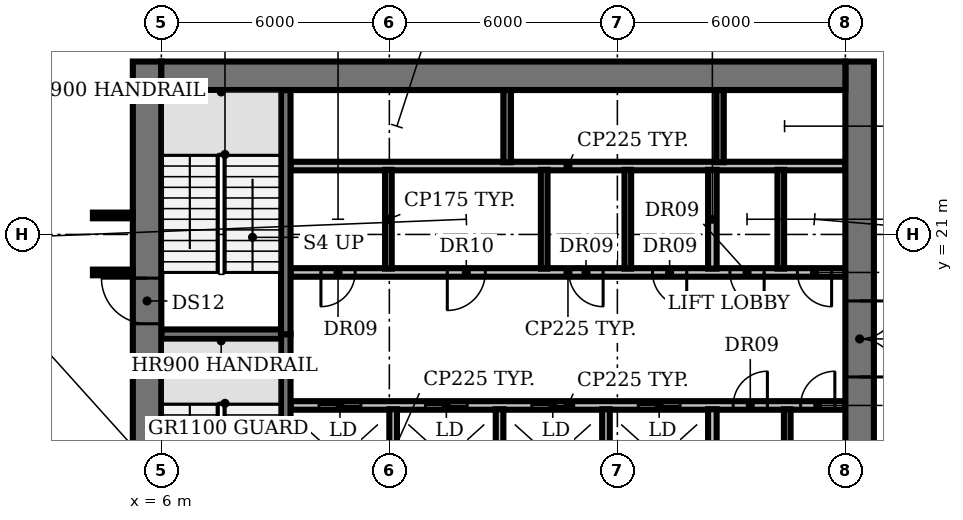
"""IFC4 building model, lengths in metres.
Left out: names, types, materials, properties, quantities, classifications, styles, units other than length and angle.
Written with IfcOpenShell. Run it as: python <this file> out.ifc"""

import sys

from ifc_helpers import new_model, si_unit, direction, frame, frame_2d, origin, place, context, subcontext, project, spatial, rectangle, extrude, element, fill, save


model = new_model("IFC4")
c1 = context("Model", 3, precision=1e-05, world=origin(), true_north=direction((0.0, 1.0)))
c2 = subcontext(c1, "Body", "Model", "MODEL_VIEW")
j1 = project(units=[si_unit("LENGTHUNIT", "METRE"), si_unit("PLANEANGLEUNIT", "RADIAN")], contexts=[c1])
p1 = place(None, origin())
s1 = spatial("IfcSite", under=j1, at=p1, CompositionType="ELEMENT")
p2 = place(p1, origin())
s2 = spatial("IfcBuilding", under=s1, at=p2, CompositionType="ELEMENT")
p3 = place(p2, frame((0.0, 0.0, 104.6)))
s3 = spatial("IfcBuildingStorey", under=s2, at=p3, CompositionType="ELEMENT", Elevation=104.6)
p4 = place(p3, frame((9.4, 16.5, 0.0), z_axis=(0.0, 0.0, 1.0), x_axis=(1.0, 0.0, 0.0)))
e1 = element("IfcWall", 1, at=p4, inside=s3, PredefinedType="PARTITIONING", context=c2, shape_type="SweptSolid", body=[
    extrude(rectangle(XDim=14.6, YDim=0.225, at=frame_2d((7.3, 0.0))), origin(), (0.0, 0.0, 1.0), 3.85),
])
p5 = place(p4, frame((0.75, 0.0, 0.0)))
e2 = element("IfcOpeningElement", 2, at=p5, cuts=e1, PredefinedType="OPENING", context=c2, shape_type="SweptSolid", body=[
    extrude(rectangle(XDim=1.1, YDim=2.1, at=frame_2d((0.55, 1.05))), frame((0.0, 0.123, 0.0), z_axis=(0.0, -1.0, 0.0), x_axis=(1.0, 0.0, 0.0)), (0.0, 0.0, 1.0), 0.245),
])
p6 = place(p4, frame((3.55, 0.0, 0.0)))
e3 = element("IfcOpeningElement", 3, at=p6, cuts=e1, PredefinedType="OPENING", context=c2, shape_type="SweptSolid", body=[
    extrude(rectangle(XDim=1.1, YDim=2.1, at=frame_2d((0.55, 1.05))), frame((0.0, 0.123, 0.0), z_axis=(0.0, -1.0, 0.0), x_axis=(1.0, 0.0, 0.0)), (0.0, 0.0, 1.0), 0.245),
])
p7 = place(p4, frame((6.35, 0.0, 0.0)))
e4 = element("IfcOpeningElement", 4, at=p7, cuts=e1, PredefinedType="OPENING", context=c2, shape_type="SweptSolid", body=[
    extrude(rectangle(XDim=1.1, YDim=2.1, at=frame_2d((0.55, 1.05))), frame((0.0, 0.123, 0.0), z_axis=(0.0, -1.0, 0.0), x_axis=(1.0, 0.0, 0.0)), (0.0, 0.0, 1.0), 0.245),
])
p8 = place(p4, frame((9.15, 0.0, 0.0)))
e5 = element("IfcOpeningElement", 5, at=p8, cuts=e1, PredefinedType="OPENING", context=c2, shape_type="SweptSolid", body=[
    extrude(rectangle(XDim=1.1, YDim=2.1, at=frame_2d((0.55, 1.05))), frame((0.0, 0.123, 0.0), z_axis=(0.0, -1.0, 0.0), x_axis=(1.0, 0.0, 0.0)), (0.0, 0.0, 1.0), 0.245),
])
p9 = place(p4, frame((11.647, 0.0, 0.0)))
e6 = element("IfcOpeningElement", 6, at=p9, cuts=e1, PredefinedType="OPENING", context=c2, shape_type="SweptSolid", body=[
    extrude(rectangle(XDim=0.9, YDim=2.1, at=frame_2d((0.45, 1.05))), frame((0.0, 0.123, 0.0), z_axis=(0.0, -1.0, 0.0), x_axis=(1.0, 0.0, 0.0)), (0.0, 0.0, 1.0), 0.245),
])
p10 = place(p4, frame((13.423, 0.0, 0.0)))
e7 = element("IfcOpeningElement", 7, at=p10, cuts=e1, PredefinedType="OPENING", context=c2, shape_type="SweptSolid", body=[
    extrude(rectangle(XDim=0.9, YDim=2.1, at=frame_2d((0.45, 1.05))), frame((0.0, 0.123, 0.0), z_axis=(0.0, -1.0, 0.0), x_axis=(1.0, 0.0, 0.0)), (0.0, 0.0, 1.0), 0.245),
])
p11 = place(p3, frame((6.0, 18.375, 0.0), z_axis=(0.0, 0.0, 1.0), x_axis=(1.0, 0.0, 0.0)))
e8 = element("IfcWall", 8, at=p11, inside=s3, PredefinedType="SHEAR", context=c2, shape_type="SweptSolid", body=[
    extrude(rectangle(XDim=3.15, YDim=0.25, at=frame_2d((1.575, 0.0))), origin(), (0.0, 0.0, 1.0), 3.85),
])
p12 = place(p3, frame((24.0, 20.0, 0.0), z_axis=(0.0, 0.0, 1.0), x_axis=(-1.0, 0.0, 0.0)))
e9 = element("IfcWall", 9, at=p12, inside=s3, PredefinedType="PARTITIONING", context=c2, shape_type="SweptSolid", body=[
    extrude(rectangle(XDim=14.6, YDim=0.225, at=frame_2d((7.3, 0.0))), origin(), (0.0, 0.0, 1.0), 3.85),
])
p13 = place(p12, frame((12.9, 0.0, 0.0)))
e10 = element("IfcOpeningElement", 10, at=p13, cuts=e9, PredefinedType="OPENING", context=c2, shape_type="SweptSolid", body=[
    extrude(rectangle(XDim=0.9, YDim=2.1, at=frame_2d((0.45, 1.05))), frame((0.0, 0.123, 0.0), z_axis=(0.0, -1.0, 0.0), x_axis=(1.0, 0.0, 0.0)), (0.0, 0.0, 1.0), 0.245),
])
p14 = place(p12, frame((9.475, 0.0, 0.0)))
e11 = element("IfcOpeningElement", 11, at=p14, cuts=e9, PredefinedType="OPENING", context=c2, shape_type="SweptSolid", body=[
    extrude(rectangle(XDim=1.0, YDim=2.1, at=frame_2d((0.5, 1.05))), frame((0.0, 0.123, 0.0), z_axis=(0.0, -1.0, 0.0), x_axis=(1.0, 0.0, 0.0)), (0.0, 0.0, 1.0), 0.245),
])
p15 = place(p12, frame((6.375, 0.0, 0.0)))
e12 = element("IfcOpeningElement", 12, at=p15, cuts=e9, PredefinedType="OPENING", context=c2, shape_type="SweptSolid", body=[
    extrude(rectangle(XDim=0.9, YDim=2.1, at=frame_2d((0.45, 1.05))), frame((0.0, 0.123, 0.0), z_axis=(0.0, -1.0, 0.0), x_axis=(1.0, 0.0, 0.0)), (0.0, 0.0, 1.0), 0.245),
])
p16 = place(p12, frame((4.175, 0.0, 0.0)))
e13 = element("IfcOpeningElement", 13, at=p16, cuts=e9, PredefinedType="OPENING", context=c2, shape_type="SweptSolid", body=[
    extrude(rectangle(XDim=0.9, YDim=2.1, at=frame_2d((0.45, 1.05))), frame((0.0, 0.123, 0.0), z_axis=(0.0, -1.0, 0.0), x_axis=(1.0, 0.0, 0.0)), (0.0, 0.0, 1.0), 0.245),
])
p17 = place(p12, frame((2.137, 0.0, 0.0)))
e14 = element("IfcOpeningElement", 14, at=p17, cuts=e9, PredefinedType="OPENING", context=c2, shape_type="SweptSolid", body=[
    extrude(rectangle(XDim=0.9, YDim=2.1, at=frame_2d((0.45, 1.05))), frame((0.0, 0.123, 0.0), z_axis=(0.0, -1.0, 0.0), x_axis=(1.0, 0.0, 0.0)), (0.0, 0.0, 1.0), 0.245),
])
p18 = place(p12, frame((0.363, 0.0, 0.0)))
e15 = element("IfcOpeningElement", 15, at=p18, cuts=e9, PredefinedType="OPENING", context=c2, shape_type="SweptSolid", body=[
    extrude(rectangle(XDim=0.9, YDim=2.1, at=frame_2d((0.45, 1.05))), frame((0.0, 0.123, 0.0), z_axis=(0.0, -1.0, 0.0), x_axis=(1.0, 0.0, 0.0)), (0.0, 0.0, 1.0), 0.245),
])
p19 = place(p3, frame((9.4, 22.8, 0.0), z_axis=(0.0, 0.0, 1.0), x_axis=(1.0, 0.0, 0.0)))
e16 = element("IfcWall", 16, at=p19, inside=s3, PredefinedType="PARTITIONING", context=c2, shape_type="SweptSolid", body=[
    extrude(rectangle(XDim=14.6, YDim=0.225, at=frame_2d((7.3, 0.0))), origin(), (0.0, 0.0, 1.0), 3.85),
])
p20 = place(p3, frame((9.275, 18.375, 0.0), z_axis=(0.0, 0.0, 1.0), x_axis=(0.0, -1.0, 0.0)))
e17 = element("IfcWall", 17, at=p20, inside=s3, PredefinedType="SHEAR", context=c2, shape_type="SweptSolid", body=[
    extrude(rectangle(XDim=6.55, YDim=0.25, at=frame_2d((3.275, 0.0))), origin(), (0.0, 0.0, 1.0), 3.85),
])
p21 = place(p20, frame((5.075, 0.0, 0.0)))
e18 = element("IfcOpeningElement", 18, at=p21, cuts=e17, PredefinedType="OPENING", context=c2, shape_type="SweptSolid", body=[
    extrude(rectangle(XDim=1.0, YDim=2.1, at=frame_2d((0.5, 1.05))), frame((0.0, 0.135, 0.0), z_axis=(0.0, -1.0, 0.0), x_axis=(1.0, 0.0, 0.0)), (0.0, 0.0, 1.0), 0.27),
])
p22 = place(p3, frame((9.275, 18.375, 0.0), z_axis=(0.0, 0.0, 1.0), x_axis=(0.0, 1.0, 0.0)))
e19 = element("IfcWall", 19, at=p22, inside=s3, PredefinedType="SHEAR", context=c2, shape_type="SweptSolid", body=[
    extrude(rectangle(XDim=6.425, YDim=0.25, at=frame_2d((3.212, 0.0))), origin(), (0.0, 0.0, 1.0), 3.85),
])
p23 = place(p3, frame((11.975, 20.1, 0.0), z_axis=(0.0, 0.0, 1.0), x_axis=(0.0, 1.0, 0.0)))
e20 = element("IfcWall", 20, at=p23, inside=s3, PredefinedType="PARTITIONING", context=c2, shape_type="SweptSolid", body=[
    extrude(rectangle(XDim=2.6, YDim=0.175, at=frame_2d((1.3, 0.0))), origin(), (0.0, 0.0, 1.0), 3.85),
])
for number, where, z_axis, x_axis in (
    (21, (12.1, 13.8, 0.0), (0.0, 0.0, 1.0), (0.0, 1.0, 0.0)),
    (22, (14.9, 13.8, 0.0), (0.0, 0.0, 1.0), (0.0, 1.0, 0.0)),
):
    element("IfcWall", number, at=place(p3, frame(where, z_axis=z_axis, x_axis=x_axis)), inside=s3, PredefinedType="SOLIDWALL", context=c2, shape_type="SweptSolid", body=[
        extrude(rectangle(XDim=2.6, YDim=0.2, at=frame_2d((1.3, 0.0))), origin(), (0.0, 0.0, 1.0), 3.85),
    ])
p24 = place(p3, frame((15.1, 22.9, 0.0), z_axis=(0.0, 0.0, 1.0), x_axis=(0.0, 1.0, 0.0)))
e23 = element("IfcWall", 23, at=p24, inside=s3, PredefinedType="SHEAR", context=c2, shape_type="SweptSolid", body=[
    extrude(rectangle(XDim=1.9, YDim=0.2, at=frame_2d((0.95, 0.0))), origin(), (0.0, 0.0, 1.0), 3.85),
])
p25 = place(p3, frame((16.075, 20.1, 0.0), z_axis=(0.0, 0.0, 1.0), x_axis=(0.0, 1.0, 0.0)))
e24 = element("IfcWall", 24, at=p25, inside=s3, PredefinedType="PARTITIONING", context=c2, shape_type="SweptSolid", body=[
    extrude(rectangle(XDim=2.6, YDim=0.175, at=frame_2d((1.3, 0.0))), origin(), (0.0, 0.0, 1.0), 3.85),
])
p26 = place(p3, frame((17.7, 13.8, 0.0), z_axis=(0.0, 0.0, 1.0), x_axis=(0.0, 1.0, 0.0)))
e25 = element("IfcWall", 25, at=p26, inside=s3, PredefinedType="SOLIDWALL", context=c2, shape_type="SweptSolid", body=[
    extrude(rectangle(XDim=2.6, YDim=0.2, at=frame_2d((1.3, 0.0))), origin(), (0.0, 0.0, 1.0), 3.85),
])
p27 = place(p3, frame((18.275, 20.1, 0.0), z_axis=(0.0, 0.0, 1.0), x_axis=(0.0, 1.0, 0.0)))
e26 = element("IfcWall", 26, at=p27, inside=s3, PredefinedType="PARTITIONING", context=c2, shape_type="SweptSolid", body=[
    extrude(rectangle(XDim=2.6, YDim=0.175, at=frame_2d((1.3, 0.0))), origin(), (0.0, 0.0, 1.0), 3.85),
])
for number, where, z_axis, x_axis in (
    (27, (20.5, 13.8, 0.0), (0.0, 0.0, 1.0), (0.0, 1.0, 0.0)),
    (28, (20.5, 20.1, 0.0), (0.0, 0.0, 1.0), (0.0, 1.0, 0.0)),
):
    element("IfcWall", number, at=place(p3, frame(where, z_axis=z_axis, x_axis=x_axis)), inside=s3, PredefinedType="PARTITIONING", context=c2, shape_type="SweptSolid", body=[
        extrude(rectangle(XDim=2.6, YDim=0.225, at=frame_2d((1.3, 0.0))), origin(), (0.0, 0.0, 1.0), 3.85),
    ])
p28 = place(p3, frame((20.7, 22.9, 0.0), z_axis=(0.0, 0.0, 1.0), x_axis=(0.0, 1.0, 0.0)))
e29 = element("IfcWall", 29, at=p28, inside=s3, PredefinedType="SHEAR", context=c2, shape_type="SweptSolid", body=[
    extrude(rectangle(XDim=1.9, YDim=0.2, at=frame_2d((0.95, 0.0))), origin(), (0.0, 0.0, 1.0), 3.85),
])
for number, where, z_axis, x_axis in (
    (30, (22.3, 20.1, 0.0), (0.0, 0.0, 1.0), (0.0, 1.0, 0.0)),
    (31, (22.47, 13.8, 0.0), (0.0, 0.0, 1.0), (0.0, 1.0, 0.0)),
):
    element("IfcWall", number, at=place(p3, frame(where, z_axis=z_axis, x_axis=x_axis)), inside=s3, PredefinedType="PARTITIONING", context=c2, shape_type="SweptSolid", body=[
        extrude(rectangle(XDim=2.6, YDim=0.175, at=frame_2d((1.3, 0.0))), origin(), (0.0, 0.0, 1.0), 3.85),
    ])
p29 = place(p3, frame((5.625, 4.47, 0.0), z_axis=(0.0, 0.0, 1.0), x_axis=(0.0, 1.0, 0.0)))
e32 = element("IfcWall", 32, at=p29, inside=s3, PredefinedType="SHEAR", context=c2, shape_type="SweptSolid", body=[
    extrude(rectangle(XDim=21.08, YDim=0.75, at=frame_2d((10.54, 0.0))), origin(), (0.0, 0.0, 1.0), 3.85),
])
p30 = place(p29, frame((1.18, 0.0, 0.0)))
e33 = element("IfcOpeningElement", 33, at=p30, cuts=e32, PredefinedType="OPENING", context=c2, shape_type="SweptSolid", body=[
    extrude(rectangle(XDim=1.5, YDim=2.1, at=frame_2d((0.75, 1.05))), frame((0.0, 0.385, 0.0), z_axis=(0.0, -1.0, 0.0), x_axis=(1.0, 0.0, 0.0)), (0.0, 0.0, 1.0), 0.77),
])
p31 = place(p29, frame((7.63, 0.0, 0.0)))
e34 = element("IfcOpeningElement", 34, at=p31, cuts=e32, PredefinedType="OPENING", context=c2, shape_type="SweptSolid", body=[
    extrude(rectangle(XDim=1.2, YDim=2.1, at=frame_2d((0.6, 1.05))), frame((0.0, 0.385, 0.0), z_axis=(0.0, -1.0, 0.0), x_axis=(1.0, 0.0, 0.0)), (0.0, 0.0, 1.0), 0.77),
])
p32 = place(p29, frame((14.18, 0.0, 0.0)))
e35 = element("IfcOpeningElement", 35, at=p32, cuts=e32, PredefinedType="OPENING", context=c2, shape_type="SweptSolid", body=[
    extrude(rectangle(XDim=1.2, YDim=2.1, at=frame_2d((0.6, 1.05))), frame((0.0, 0.385, 0.0), z_axis=(0.0, -1.0, 0.0), x_axis=(1.0, 0.0, 0.0)), (0.0, 0.0, 1.0), 0.77),
])
p33 = place(p3, frame((24.375, 25.55, 0.0), z_axis=(0.0, 0.0, 1.0), x_axis=(0.0, -1.0, 0.0)))
e36 = element("IfcWall", 36, at=p33, inside=s3, PredefinedType="SHEAR", context=c2, shape_type="SweptSolid", body=[
    extrude(rectangle(XDim=21.13, YDim=0.75, at=frame_2d((10.565, 0.0))), origin(), (0.0, 0.0, 1.0), 3.85),
])
p34 = place(p33, frame((18.4, 0.0, 0.0)))
e37 = element("IfcOpeningElement", 37, at=p34, cuts=e36, PredefinedType="OPENING", context=c2, shape_type="SweptSolid", body=[
    extrude(rectangle(XDim=1.5, YDim=2.1, at=frame_2d((0.75, 1.05))), frame((0.0, 0.385, 0.0), z_axis=(0.0, -1.0, 0.0), x_axis=(1.0, 0.0, 0.0)), (0.0, 0.0, 1.0), 0.77),
])
p35 = place(p33, frame((12.3, 0.0, 0.0)))
e38 = element("IfcOpeningElement", 38, at=p35, cuts=e36, PredefinedType="OPENING", context=c2, shape_type="SweptSolid", body=[
    extrude(rectangle(XDim=0.9, YDim=2.1, at=frame_2d((0.45, 1.05))), frame((0.0, 0.385, 0.0), z_axis=(0.0, -1.0, 0.0), x_axis=(1.0, 0.0, 0.0)), (0.0, 0.0, 1.0), 0.77),
])
p36 = place(p33, frame((6.3, 0.0, 0.0)))
e39 = element("IfcOpeningElement", 39, at=p36, cuts=e36, PredefinedType="OPENING", context=c2, shape_type="SweptSolid", body=[
    extrude(rectangle(XDim=2.0, YDim=2.1, at=frame_2d((1.0, 1.05))), frame((0.0, 0.385, 0.0), z_axis=(0.0, -1.0, 0.0), x_axis=(1.0, 0.0, 0.0)), (0.0, 0.0, 1.0), 0.77),
])
p37 = place(p3, frame((6.0, 25.175, 0.0), z_axis=(0.0, 0.0, 1.0), x_axis=(1.0, 0.0, 0.0)))
e40 = element("IfcWall", 40, at=p37, inside=s3, PredefinedType="SHEAR", context=c2, shape_type="SweptSolid", body=[
    extrude(rectangle(XDim=18.0, YDim=0.75, at=frame_2d((9.0, 0.0))), origin(), (0.0, 0.0, 1.0), 3.85),
])
for number, where, z_axis, x_axis in (
    (41, (4.2, 20.0, 0.0), (0.0, 0.0, 1.0), (1.0, 0.0, 0.0)),
    (42, (4.2, 21.5, 0.0), (0.0, 0.0, 1.0), (1.0, 0.0, 0.0)),
):
    element("IfcWall", number, at=place(p3, frame(where, z_axis=z_axis, x_axis=x_axis)), inside=s3, PredefinedType="PARTITIONING", context=c2, shape_type="SweptSolid", body=[
        extrude(rectangle(XDim=1.05, YDim=0.15, at=frame_2d((0.525, 0.0))), origin(), (0.0, 0.0, 1.0), 2.83),
    ])
p38 = place(p5, origin())
e43 = element("IfcDoor", 43, at=p38, inside=s3, OperationType="DOUBLE_DOOR_SLIDING", PredefinedType="DOOR", context=c2, shape_type="SweptSolid", body=[
    extrude(rectangle(XDim=1.1, YDim=2.1, at=frame_2d((0.55, 1.05))), frame((0.0, 0.025, 0.0), z_axis=(0.0, -1.0, 0.0), x_axis=(1.0, 0.0, 0.0)), (0.0, 0.0, 1.0), 0.05),
])
fill(e2, e43)
p39 = place(p6, origin())
e44 = element("IfcDoor", 44, at=p39, inside=s3, OperationType="DOUBLE_DOOR_SLIDING", PredefinedType="DOOR", context=c2, shape_type="SweptSolid", body=[
    extrude(rectangle(XDim=1.1, YDim=2.1, at=frame_2d((0.55, 1.05))), frame((0.0, 0.025, 0.0), z_axis=(0.0, -1.0, 0.0), x_axis=(1.0, 0.0, 0.0)), (0.0, 0.0, 1.0), 0.05),
])
fill(e3, e44)
p40 = place(p7, origin())
e45 = element("IfcDoor", 45, at=p40, inside=s3, OperationType="DOUBLE_DOOR_SLIDING", PredefinedType="DOOR", context=c2, shape_type="SweptSolid", body=[
    extrude(rectangle(XDim=1.1, YDim=2.1, at=frame_2d((0.55, 1.05))), frame((0.0, 0.025, 0.0), z_axis=(0.0, -1.0, 0.0), x_axis=(1.0, 0.0, 0.0)), (0.0, 0.0, 1.0), 0.05),
])
fill(e4, e45)
p41 = place(p8, origin())
e46 = element("IfcDoor", 46, at=p41, inside=s3, OperationType="DOUBLE_DOOR_SLIDING", PredefinedType="DOOR", context=c2, shape_type="SweptSolid", body=[
    extrude(rectangle(XDim=1.1, YDim=2.1, at=frame_2d((0.55, 1.05))), frame((0.0, 0.025, 0.0), z_axis=(0.0, -1.0, 0.0), x_axis=(1.0, 0.0, 0.0)), (0.0, 0.0, 1.0), 0.05),
])
fill(e5, e46)
p42 = place(p9, origin())
e47 = element("IfcDoor", 47, at=p42, inside=s3, OperationType="SINGLE_SWING_RIGHT", PredefinedType="DOOR", context=c2, shape_type="SweptSolid", body=[
    extrude(rectangle(XDim=0.9, YDim=2.1, at=frame_2d((0.45, 1.05))), frame((0.0, 0.025, 0.0), z_axis=(0.0, -1.0, 0.0), x_axis=(1.0, 0.0, 0.0)), (0.0, 0.0, 1.0), 0.05),
])
fill(e6, e47)
p43 = place(p10, origin())
e48 = element("IfcDoor", 48, at=p43, inside=s3, OperationType="SINGLE_SWING_RIGHT", PredefinedType="DOOR", context=c2, shape_type="SweptSolid", body=[
    extrude(rectangle(XDim=0.9, YDim=2.1, at=frame_2d((0.45, 1.05))), frame((0.0, 0.025, 0.0), z_axis=(0.0, -1.0, 0.0), x_axis=(1.0, 0.0, 0.0)), (0.0, 0.0, 1.0), 0.05),
])
fill(e7, e48)
p44 = place(p13, origin())
e49 = element("IfcDoor", 49, at=p44, inside=s3, OperationType="SINGLE_SWING_RIGHT", PredefinedType="DOOR", context=c2, shape_type="SweptSolid", body=[
    extrude(rectangle(XDim=0.9, YDim=2.1, at=frame_2d((0.45, 1.05))), frame((0.0, 0.025, 0.0), z_axis=(0.0, -1.0, 0.0), x_axis=(1.0, 0.0, 0.0)), (0.0, 0.0, 1.0), 0.05),
])
fill(e10, e49)
p45 = place(p14, origin())
e50 = element("IfcDoor", 50, at=p45, inside=s3, OperationType="SINGLE_SWING_RIGHT", PredefinedType="DOOR", context=c2, shape_type="SweptSolid", body=[
    extrude(rectangle(XDim=1.0, YDim=2.1, at=frame_2d((0.5, 1.05))), frame((0.0, 0.025, 0.0), z_axis=(0.0, -1.0, 0.0), x_axis=(1.0, 0.0, 0.0)), (0.0, 0.0, 1.0), 0.05),
])
fill(e11, e50)
p46 = place(p15, origin())
e51 = element("IfcDoor", 51, at=p46, inside=s3, OperationType="SINGLE_SWING_LEFT", PredefinedType="DOOR", context=c2, shape_type="SweptSolid", body=[
    extrude(rectangle(XDim=0.9, YDim=2.1, at=frame_2d((0.45, 1.05))), frame((0.0, 0.025, 0.0), z_axis=(0.0, -1.0, 0.0), x_axis=(1.0, 0.0, 0.0)), (0.0, 0.0, 1.0), 0.05),
])
fill(e12, e51)
p47 = place(p16, origin())
e52 = element("IfcDoor", 52, at=p47, inside=s3, OperationType="SINGLE_SWING_LEFT", PredefinedType="DOOR", context=c2, shape_type="SweptSolid", body=[
    extrude(rectangle(XDim=0.9, YDim=2.1, at=frame_2d((0.45, 1.05))), frame((0.0, 0.025, 0.0), z_axis=(0.0, -1.0, 0.0), x_axis=(1.0, 0.0, 0.0)), (0.0, 0.0, 1.0), 0.05),
])
fill(e13, e52)
p48 = place(p17, origin())
e53 = element("IfcDoor", 53, at=p48, inside=s3, OperationType="SINGLE_SWING_LEFT", PredefinedType="DOOR", context=c2, shape_type="SweptSolid", body=[
    extrude(rectangle(XDim=0.9, YDim=2.1, at=frame_2d((0.45, 1.05))), frame((0.0, 0.025, 0.0), z_axis=(0.0, -1.0, 0.0), x_axis=(1.0, 0.0, 0.0)), (0.0, 0.0, 1.0), 0.05),
])
fill(e14, e53)
p49 = place(p18, origin())
e54 = element("IfcDoor", 54, at=p49, inside=s3, OperationType="SINGLE_SWING_LEFT", PredefinedType="DOOR", context=c2, shape_type="SweptSolid", body=[
    extrude(rectangle(XDim=0.9, YDim=2.1, at=frame_2d((0.45, 1.05))), frame((0.0, 0.025, 0.0), z_axis=(0.0, -1.0, 0.0), x_axis=(1.0, 0.0, 0.0)), (0.0, 0.0, 1.0), 0.05),
])
fill(e15, e54)
p50 = place(p32, origin())
e55 = element("IfcDoor", 55, at=p50, inside=s3, OperationType="SINGLE_SWING_RIGHT", PredefinedType="DOOR", context=c2, shape_type="SweptSolid", body=[
    extrude(rectangle(XDim=1.2, YDim=2.1, at=frame_2d((0.6, 1.05))), frame((0.0, 0.025, 0.0), z_axis=(0.0, -1.0, 0.0), x_axis=(1.0, 0.0, 0.0)), (0.0, 0.0, 1.0), 0.05),
])
fill(e35, e55)
p51 = place(p36, origin())
e56 = element("IfcDoor", 56, at=p51, inside=s3, OperationType="DOUBLE_DOOR_SINGLE_SWING", PredefinedType="DOOR", context=c2, shape_type="SweptSolid", body=[
    extrude(rectangle(XDim=2.0, YDim=2.1, at=frame_2d((1.0, 1.05))), frame((0.0, 0.025, 0.0), z_axis=(0.0, -1.0, 0.0), x_axis=(1.0, 0.0, 0.0)), (0.0, 0.0, 1.0), 0.05),
])
fill(e39, e56)
save(model, sys.argv[1])
